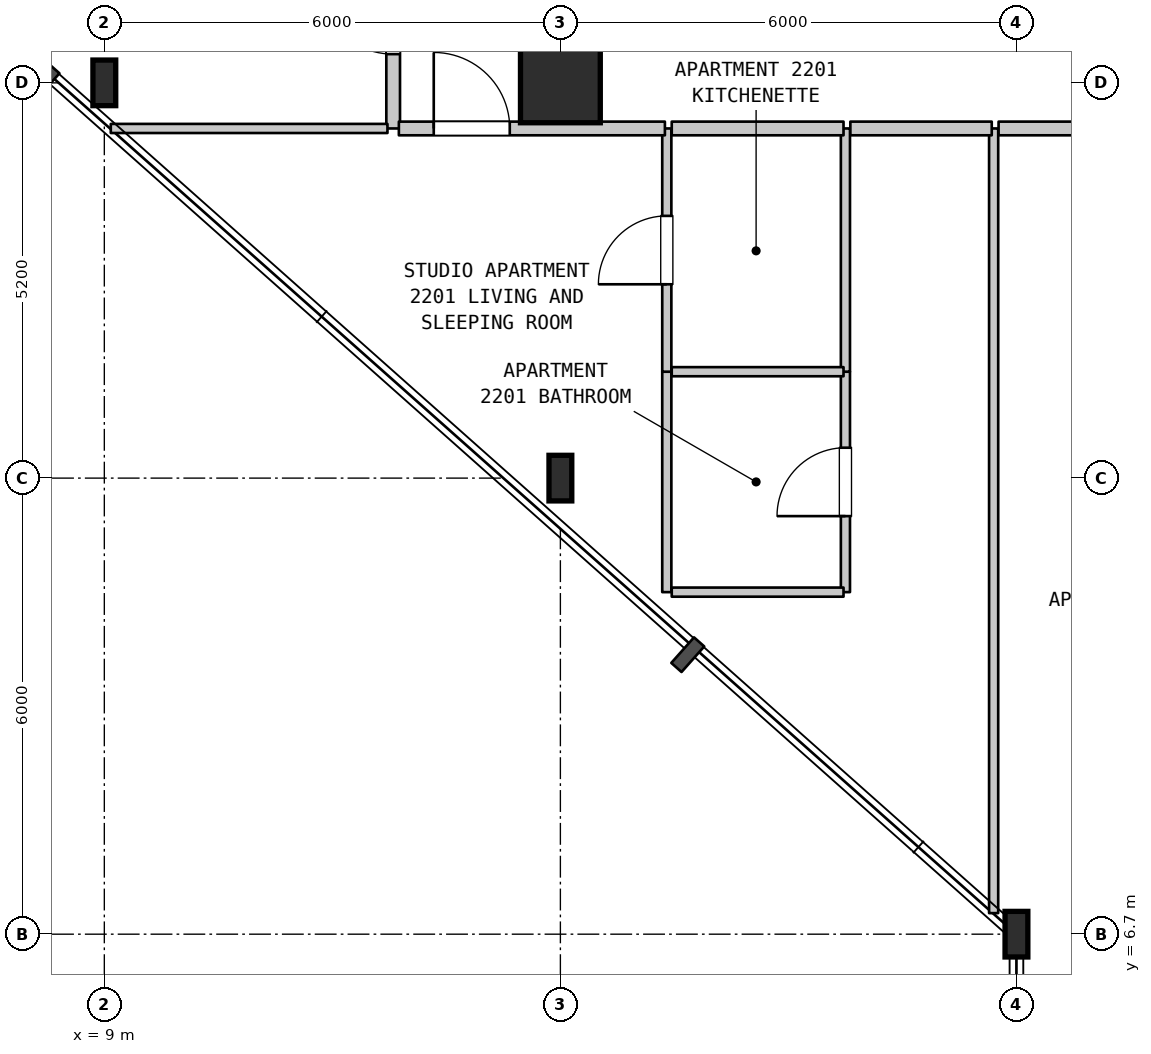
"""IFC4 building model, lengths in metres.
Left out: names, types, materials, properties, quantities, classifications, styles, units other than length and angle.
Written with IfcOpenShell. Run it as: python <this file> out.ifc"""

import sys

from ifc_helpers import new_model, si_unit, direction, frame, frame_2d, origin, origin_2d, place, context, subcontext, project, spatial, rectangle, i_section, extrude, element, fill, save


model = new_model("IFC4")
c1 = context("Model", 3, precision=1e-05, world=origin(), true_north=direction((0.0, 1.0)))
c2 = subcontext(c1, "Body", "Model", "MODEL_VIEW")
j1 = project(units=[si_unit("LENGTHUNIT", "METRE"), si_unit("PLANEANGLEUNIT", "RADIAN")], contexts=[c1])
p1 = place(None, origin())
s1 = spatial("IfcSite", under=j1, at=p1, CompositionType="ELEMENT")
p2 = place(p1, origin())
s2 = spatial("IfcBuilding", under=s1, at=p2, CompositionType="ELEMENT")
p3 = place(p2, frame((0.0, 0.0, 94.6)))
s3 = spatial("IfcBuildingStorey", under=s2, at=p3, CompositionType="ELEMENT", Elevation=94.6)
for number, where, z_axis, x_axis in (
    (1, (9.0, 17.9, 0.0), (0.0, 0.0, 1.0), (1.0, 0.0, 0.0)),
    (2, (15.0, 12.7, 0.0), (0.0, 0.0, 1.0), (1.0, 0.0, 0.0)),
):
    element("IfcColumn", number, at=place(p3, frame(where, z_axis=z_axis, x_axis=x_axis)), inside=s3, PredefinedType="COLUMN", context=c2, shape_type="SweptSolid", body=[
        extrude(i_section(OverallWidth=0.3, OverallDepth=0.6, WebThickness=0.015, FlangeThickness=0.03, FilletRadius=0.027, at=origin_2d()), origin(), (0.0, 0.0, 1.0), 3.7),
    ])
p4 = place(p3, frame((15.0, 17.9, 0.0), z_axis=(0.0, 0.0, 1.0), x_axis=(1.0, 0.0, 0.0)))
e3 = element("IfcColumn", 3, at=p4, inside=s3, PredefinedType="COLUMN", context=c2, shape_type="SweptSolid", body=[
    extrude(rectangle(XDim=1.05, YDim=1.05, at=origin_2d()), origin(), (0.0, 0.0, 1.0), 3.7),
])
p5 = place(p3, frame((21.0, 6.7, 0.0), z_axis=(0.0, 0.0, 1.0), x_axis=(1.0, 0.0, 0.0)))
e4 = element("IfcColumn", 4, at=p5, inside=s3, PredefinedType="COLUMN", context=c2, shape_type="SweptSolid", body=[
    extrude(i_section(OverallWidth=0.3, OverallDepth=0.6, WebThickness=0.015, FlangeThickness=0.03, FilletRadius=0.027, at=origin_2d()), origin(), (0.0, 0.0, 1.0), 3.7),
])
p6 = place(p3, frame((12.8, 17.3, 0.0), z_axis=(0.0, 0.0, 1.0), x_axis=(0.0, 1.0, 0.0)))
e5 = element("IfcWall", 5, at=p6, inside=s3, PredefinedType="STANDARD", context=c2, shape_type="SweptSolid", body=[
    extrude(rectangle(XDim=3.1, YDim=0.18, at=frame_2d((1.55, 0.0))), origin(), (0.0, 0.0, 1.0), 3.385),
])
p7 = place(p6, frame((0.978, 0.0, 0.0)))
e6 = element("IfcOpeningElement", 6, at=p7, cuts=e5, PredefinedType="OPENING", context=c2, shape_type="SweptSolid", body=[
    extrude(rectangle(XDim=1.0, YDim=2.15, at=frame_2d((0.5, 1.075))), frame((0.0, 0.1, 0.0), z_axis=(0.0, -1.0, 0.0), x_axis=(1.0, 0.0, 0.0)), (0.0, 0.0, 1.0), 0.2),
])
p8 = place(p3, frame((16.4, 11.2, 0.0), z_axis=(0.0, 0.0, 1.0), x_axis=(0.0, 1.0, 0.0)))
e7 = element("IfcWall", 7, at=p8, inside=s3, PredefinedType="PARTITIONING", context=c2, shape_type="SweptSolid", body=[
    extrude(rectangle(XDim=2.9, YDim=0.12, at=frame_2d((1.45, 0.0))), origin(), (0.0, 0.0, 1.0), 3.385),
])
p9 = place(p3, frame((16.4, 14.1, 0.0), z_axis=(0.0, 0.0, 1.0), x_axis=(0.0, 1.0, 0.0)))
e8 = element("IfcWall", 8, at=p9, inside=s3, PredefinedType="PARTITIONING", context=c2, shape_type="SweptSolid", body=[
    extrude(rectangle(XDim=3.2, YDim=0.12, at=frame_2d((1.6, 0.0))), origin(), (0.0, 0.0, 1.0), 3.385),
])
p10 = place(p9, frame((1.15, 0.0, 0.0)))
e9 = element("IfcOpeningElement", 9, at=p10, cuts=e8, PredefinedType="OPENING", context=c2, shape_type="SweptSolid", body=[
    extrude(rectangle(XDim=0.9, YDim=2.15, at=frame_2d((0.45, 1.075))), frame((0.0, 0.07, 0.0), z_axis=(0.0, -1.0, 0.0), x_axis=(1.0, 0.0, 0.0)), (0.0, 0.0, 1.0), 0.14),
])
p11 = place(p3, frame((18.75, 11.2, 0.0), z_axis=(0.0, 0.0, 1.0), x_axis=(0.0, 1.0, 0.0)))
e10 = element("IfcWall", 10, at=p11, inside=s3, PredefinedType="PARTITIONING", context=c2, shape_type="SweptSolid", body=[
    extrude(rectangle(XDim=2.9, YDim=0.12, at=frame_2d((1.45, 0.0))), origin(), (0.0, 0.0, 1.0), 3.385),
])
p12 = place(p11, frame((1.0, 0.0, 0.0)))
e11 = element("IfcOpeningElement", 11, at=p12, cuts=e10, PredefinedType="OPENING", context=c2, shape_type="SweptSolid", body=[
    extrude(rectangle(XDim=0.9, YDim=2.1, at=frame_2d((0.45, 1.05))), frame((0.0, 0.07, 0.0), z_axis=(0.0, -1.0, 0.0), x_axis=(1.0, 0.0, 0.0)), (0.0, 0.0, 1.0), 0.14),
])
p13 = place(p3, frame((18.75, 14.1, 0.0), z_axis=(0.0, 0.0, 1.0), x_axis=(0.0, 1.0, 0.0)))
e12 = element("IfcWall", 12, at=p13, inside=s3, PredefinedType="PARTITIONING", context=c2, shape_type="SweptSolid", body=[
    extrude(rectangle(XDim=3.2, YDim=0.12, at=frame_2d((1.6, 0.0))), origin(), (0.0, 0.0, 1.0), 3.385),
])
p14 = place(p3, frame((20.7, 6.977, 0.0), z_axis=(0.0, 0.0, 1.0), x_axis=(0.0, 1.0, 0.0)))
e13 = element("IfcWall", 13, at=p14, inside=s3, PredefinedType="PARTITIONING", context=c2, shape_type="SweptSolid", body=[
    extrude(rectangle(XDim=10.323, YDim=0.12, at=frame_2d((5.162, 0.0))), origin(), (0.0, 0.0, 1.0), 3.385),
])
for number, where, z_axis, x_axis in (
    (14, (16.465, 11.2, 0.0), (0.0, 0.0, 1.0), (1.0, 0.0, 0.0)),
    (15, (16.465, 14.1, 0.0), (0.0, 0.0, 1.0), (1.0, 0.0, 0.0)),
):
    element("IfcWall", number, at=place(p3, frame(where, z_axis=z_axis, x_axis=x_axis)), inside=s3, PredefinedType="PARTITIONING", context=c2, shape_type="SweptSolid", body=[
        extrude(rectangle(XDim=2.26, YDim=0.12, at=frame_2d((1.13, 0.0))), origin(), (0.0, 0.0, 1.0), 3.385),
    ])
p15 = place(p3, frame((9.085, 17.3, 0.0), z_axis=(0.0, 0.0, 1.0), x_axis=(1.0, 0.0, 0.0)))
e16 = element("IfcWall", 16, at=p15, inside=s3, PredefinedType="PARTITIONING", context=c2, shape_type="SweptSolid", body=[
    extrude(rectangle(XDim=3.64, YDim=0.12, at=frame_2d((1.82, 0.0))), origin(), (0.0, 0.0, 1.0), 3.385),
])
p16 = place(p3, frame((12.875, 17.3, 0.0), z_axis=(0.0, 0.0, 1.0), x_axis=(1.0, 0.0, 0.0)))
e17 = element("IfcWall", 17, at=p16, inside=s3, PredefinedType="STANDARD", context=c2, shape_type="SweptSolid", body=[
    extrude(rectangle(XDim=3.5, YDim=0.18, at=frame_2d((1.75, 0.0))), origin(), (0.0, 0.0, 1.0), 3.385),
])
p17 = place(p16, frame((0.459, 0.0, 0.0)))
e18 = element("IfcOpeningElement", 18, at=p17, cuts=e17, PredefinedType="OPENING", context=c2, shape_type="SweptSolid", body=[
    extrude(rectangle(XDim=1.0, YDim=2.15, at=frame_2d((0.5, 1.075))), frame((0.0, 0.1, 0.0), z_axis=(0.0, -1.0, 0.0), x_axis=(1.0, 0.0, 0.0)), (0.0, 0.0, 1.0), 0.2),
])
p18 = place(p3, frame((16.465, 17.3, 0.0), z_axis=(0.0, 0.0, 1.0), x_axis=(1.0, 0.0, 0.0)))
e19 = element("IfcWall", 19, at=p18, inside=s3, PredefinedType="STANDARD", context=c2, shape_type="SweptSolid", body=[
    extrude(rectangle(XDim=2.26, YDim=0.18, at=frame_2d((1.13, 0.0))), origin(), (0.0, 0.0, 1.0), 3.385),
])
p19 = place(p3, frame((18.815, 17.3, 0.0), z_axis=(0.0, 0.0, 1.0), x_axis=(1.0, 0.0, 0.0)))
e20 = element("IfcWall", 20, at=p19, inside=s3, PredefinedType="STANDARD", context=c2, shape_type="SweptSolid", body=[
    extrude(rectangle(XDim=1.86, YDim=0.18, at=frame_2d((0.93, 0.0))), origin(), (0.0, 0.0, 1.0), 3.385),
])
p20 = place(p3, frame((20.765, 17.3, 0.0), z_axis=(0.0, 0.0, 1.0), x_axis=(1.0, 0.0, 0.0)))
e21 = element("IfcWall", 21, at=p20, inside=s3, PredefinedType="STANDARD", context=c2, shape_type="SweptSolid", body=[
    extrude(rectangle(XDim=4.52, YDim=0.18, at=frame_2d((2.26, 0.0))), origin(), (0.0, 0.0, 1.0), 3.385),
])
p21 = place(p20, frame((1.76, 0.0, 0.0)))
e22 = element("IfcOpeningElement", 22, at=p21, cuts=e21, PredefinedType="OPENING", context=c2, shape_type="SweptSolid", body=[
    extrude(rectangle(XDim=1.0, YDim=2.15, at=frame_2d((0.5, 1.075))), frame((0.0, 0.1, 0.0), z_axis=(0.0, -1.0, 0.0), x_axis=(1.0, 0.0, 0.0)), (0.0, 0.0, 1.0), 0.2),
])
p22 = place(p7, origin())
e23 = element("IfcDoor", 23, at=p22, inside=s3, OperationType="SINGLE_SWING_RIGHT", PredefinedType="DOOR", context=c2, shape_type="SweptSolid", body=[
    extrude(rectangle(XDim=1.0, YDim=2.15, at=frame_2d((0.5, 1.075))), frame((0.0, 0.025, 0.0), z_axis=(0.0, -1.0, 0.0), x_axis=(1.0, 0.0, 0.0)), (0.0, 0.0, 1.0), 0.05),
])
fill(e6, e23)
p23 = place(p10, origin())
e24 = element("IfcDoor", 24, at=p23, inside=s3, OperationType="SINGLE_SWING_LEFT", PredefinedType="DOOR", context=c2, shape_type="SweptSolid", body=[
    extrude(rectangle(XDim=0.9, YDim=2.15, at=frame_2d((0.45, 1.075))), frame((0.0, 0.025, 0.0), z_axis=(0.0, -1.0, 0.0), x_axis=(1.0, 0.0, 0.0)), (0.0, 0.0, 1.0), 0.05),
])
fill(e9, e24)
p24 = place(p12, origin())
e25 = element("IfcDoor", 25, at=p24, inside=s3, OperationType="SINGLE_SWING_LEFT", PredefinedType="DOOR", context=c2, shape_type="SweptSolid", body=[
    extrude(rectangle(XDim=0.9, YDim=2.1, at=frame_2d((0.45, 1.05))), frame((0.0, 0.025, 0.0), z_axis=(0.0, -1.0, 0.0), x_axis=(1.0, 0.0, 0.0)), (0.0, 0.0, 1.0), 0.05),
])
fill(e11, e25)
p25 = place(p17, origin())
e26 = element("IfcDoor", 26, at=p25, inside=s3, OperationType="SINGLE_SWING_LEFT", PredefinedType="DOOR", context=c2, shape_type="SweptSolid", body=[
    extrude(rectangle(XDim=1.0, YDim=2.15, at=frame_2d((0.5, 1.075))), frame((0.0, 0.025, 0.0), z_axis=(0.0, -1.0, 0.0), x_axis=(1.0, 0.0, 0.0)), (0.0, 0.0, 1.0), 0.05),
])
fill(e18, e26)
save(model, sys.argv[1])
